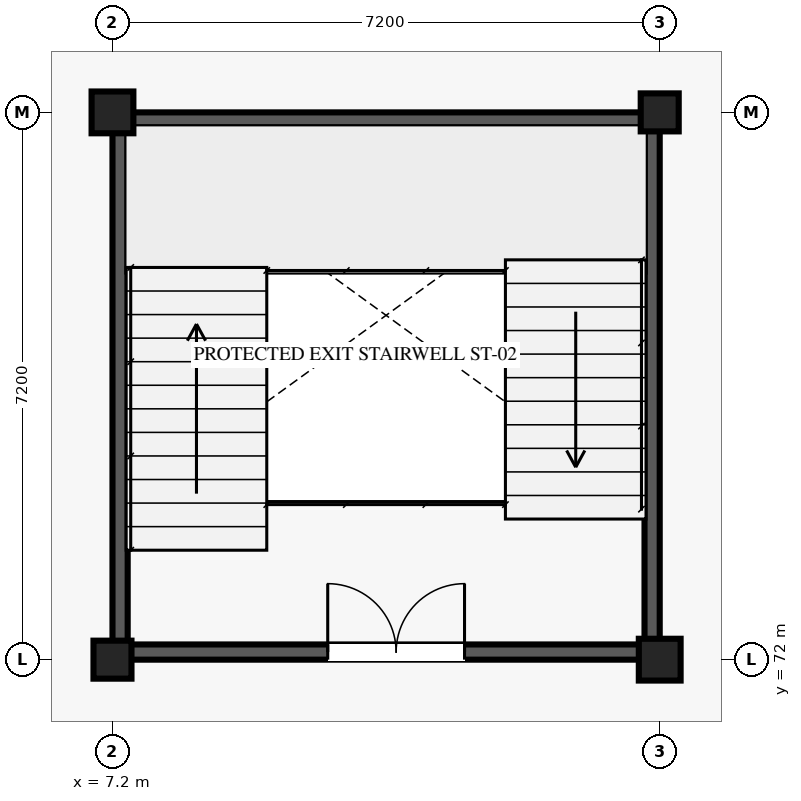
"""IFC4 building model, lengths in metres.
Left out: names, types, materials, properties, quantities, classifications, styles, units other than length and angle.
Written with IfcOpenShell. Run it as: python <this file> out.ifc"""

import sys

from ifc_helpers import new_model, si_unit, direction, frame, frame_2d, origin, origin_2d, place, context, subcontext, project, spatial, rectangle, extrude, element, fill, save


model = new_model("IFC4")
c1 = context("Model", 3, precision=1e-05, world=origin(), true_north=direction((0.0, 1.0)))
c2 = subcontext(c1, "Body", "Model", "MODEL_VIEW")
j1 = project(units=[si_unit("LENGTHUNIT", "METRE"), si_unit("PLANEANGLEUNIT", "RADIAN")], contexts=[c1])
p1 = place(None, origin())
s1 = spatial("IfcSite", under=j1, at=p1, CompositionType="ELEMENT")
p2 = place(p1, origin())
s2 = spatial("IfcBuilding", under=s1, at=p2, CompositionType="ELEMENT")
p3 = place(p2, frame((0.0, 0.0, 29.7)))
s3 = spatial("IfcBuildingStorey", under=s2, at=p3, CompositionType="ELEMENT", Elevation=29.7)
p4 = place(p3, frame((7.2, 72.0, 0.0), z_axis=(0.0, 0.0, 1.0), x_axis=(1.0, 0.0, 0.0)))
e1 = element("IfcColumn", 1, at=p4, inside=s3, PredefinedType="COLUMN", context=c2, shape_type="SweptSolid", body=[
    extrude(rectangle(XDim=0.5, YDim=0.5, at=origin_2d()), origin(), (0.0, 0.0, 1.0), 4.05),
])
for number, where, z_axis, x_axis in (
    (2, (7.2, 79.2, 0.0), (0.0, 0.0, 1.0), (1.0, 0.0, 0.0)),
    (3, (14.4, 72.0, 0.0), (0.0, 0.0, 1.0), (1.0, 0.0, 0.0)),
):
    element("IfcColumn", number, at=place(p3, frame(where, z_axis=z_axis, x_axis=x_axis)), inside=s3, PredefinedType="COLUMN", context=c2, shape_type="SweptSolid", body=[
        extrude(rectangle(XDim=0.55, YDim=0.55, at=origin_2d()), origin(), (0.0, 0.0, 1.0), 4.05),
    ])
p5 = place(p3, frame((14.4, 79.2, 0.0), z_axis=(0.0, 0.0, 1.0), x_axis=(1.0, 0.0, 0.0)))
e4 = element("IfcColumn", 4, at=p5, inside=s3, PredefinedType="COLUMN", context=c2, shape_type="SweptSolid", body=[
    extrude(rectangle(XDim=0.5, YDim=0.5, at=origin_2d()), origin(), (0.0, 0.0, 1.0), 4.05),
])
p6 = place(p3, frame((7.4, 72.1, 0.0), z_axis=(0.0, 0.0, 1.0), x_axis=(1.0, 0.0, 0.0)))
e5 = element("IfcWall", 5, at=p6, inside=s3, PredefinedType="SHEAR", context=c2, shape_type="SweptSolid", body=[
    extrude(rectangle(XDim=6.8, YDim=0.2, at=frame_2d((3.4, 0.0))), origin(), (0.0, 0.0, 1.0), 3.83),
])
p7 = place(p6, frame((2.632, 0.0, 0.0)))
e6 = element("IfcOpeningElement", 6, at=p7, cuts=e5, PredefinedType="OPENING", context=c2, shape_type="SweptSolid", body=[
    extrude(rectangle(XDim=1.8, YDim=2.2, at=frame_2d((0.9, 1.1))), frame((0.0, 0.11, 0.0), z_axis=(0.0, -1.0, 0.0), x_axis=(1.0, 0.0, 0.0)), (0.0, 0.0, 1.0), 0.22),
])
for number, where, z_axis, x_axis in (
    (7, (7.4, 79.1, 0.0), (0.0, 0.0, 1.0), (1.0, 0.0, 0.0)),
    (8, (7.3, 72.2, 0.0), (0.0, 0.0, 1.0), (0.0, 1.0, 0.0)),
    (9, (14.3, 72.2, 0.0), (0.0, 0.0, 1.0), (0.0, 1.0, 0.0)),
):
    element("IfcWall", number, at=place(p3, frame(where, z_axis=z_axis, x_axis=x_axis)), inside=s3, PredefinedType="SHEAR", context=c2, shape_type="SweptSolid", body=[
        extrude(rectangle(XDim=6.8, YDim=0.2, at=frame_2d((3.4, 0.0))), origin(), (0.0, 0.0, 1.0), 3.83),
    ])
p8 = place(p7, origin())
e10 = element("IfcDoor", 10, at=p8, inside=s3, OperationType="DOUBLE_DOOR_SINGLE_SWING", PredefinedType="DOOR", context=c2, shape_type="SweptSolid", body=[
    extrude(rectangle(XDim=1.8, YDim=2.2, at=frame_2d((0.9, 1.1))), frame((0.0, 0.025, 0.0), z_axis=(0.0, -1.0, 0.0), x_axis=(1.0, 0.0, 0.0)), (0.0, 0.0, 1.0), 0.05),
])
fill(e6, e10)
save(model, sys.argv[1])
